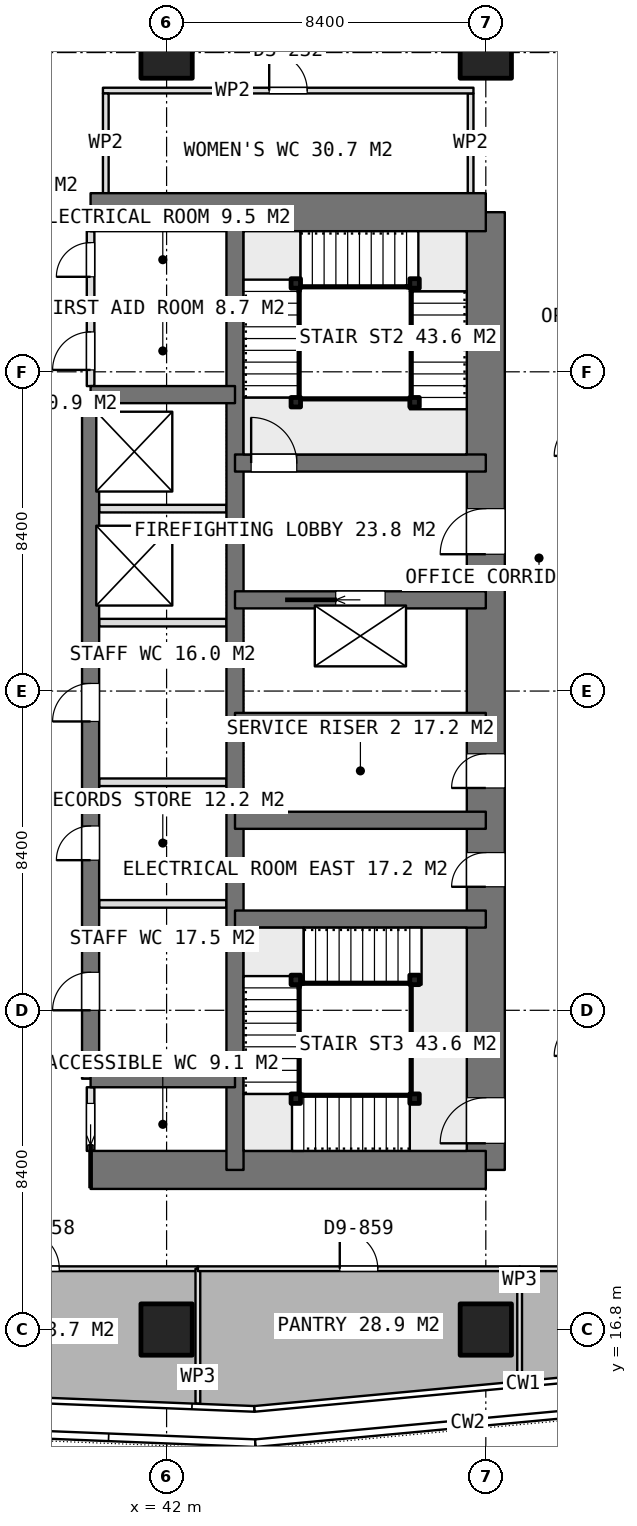
"""IFC4 building model, lengths in metres.
Left out: names, types, materials, properties, quantities, classifications, styles, units other than length and angle.
Written with IfcOpenShell. Run it as: python <this file> out.ifc"""

import sys

from ifc_helpers import new_model, si_unit, direction, frame, frame_2d, origin, origin_2d, place, context, subcontext, project, spatial, rectangle, extrude, element, fill, save


model = new_model("IFC4")
c1 = context("Model", 3, precision=1e-05, world=origin(), true_north=direction((0.0, 1.0)))
c2 = subcontext(c1, "Body", "Model", "MODEL_VIEW")
j1 = project(units=[si_unit("LENGTHUNIT", "METRE"), si_unit("PLANEANGLEUNIT", "RADIAN")], contexts=[c1])
p1 = place(None, origin())
s1 = spatial("IfcSite", under=j1, at=p1, CompositionType="ELEMENT")
p2 = place(p1, origin())
s2 = spatial("IfcBuilding", under=s1, at=p2, CompositionType="ELEMENT")
p3 = place(p2, frame((0.0, 0.0, 213.95)))
s3 = spatial("IfcBuildingStorey", under=s2, at=p3, CompositionType="ELEMENT", Elevation=213.95)
for number, where, z_axis, x_axis in (
    (1, (40.0, 21.0, 0.0), (0.0, 0.0, 1.0), (1.0, 0.0, 0.0)),
    (2, (40.0, 46.2, 0.0), (0.0, 0.0, 1.0), (1.0, 0.0, 0.0)),
):
    element("IfcWall", number, at=place(p3, frame(where, z_axis=z_axis, x_axis=x_axis)), inside=s3, PredefinedType="SHEAR", context=c2, shape_type="SweptSolid", body=[
        extrude(rectangle(XDim=10.4, YDim=1.0, at=frame_2d((5.2, 0.0))), origin(), (0.0, 0.0, 1.0), 3.75),
    ])
p4 = place(p3, frame((50.4, 21.0, 0.0), z_axis=(0.0, 0.0, 1.0), x_axis=(0.0, 1.0, 0.0)))
e3 = element("IfcWall", 3, at=p4, inside=s3, PredefinedType="SHEAR", context=c2, shape_type="SweptSolid", body=[
    extrude(rectangle(XDim=25.2, YDim=1.0, at=frame_2d((12.6, 0.0))), origin(), (0.0, 0.0, 1.0), 3.75),
])
p5 = place(p4, frame((16.2, 0.0, 0.0)))
e4 = element("IfcOpeningElement", 4, at=p5, cuts=e3, PredefinedType="OPENING", context=c2, shape_type="SweptSolid", body=[
    extrude(rectangle(XDim=1.2, YDim=2.1, at=frame_2d((0.6, 1.05))), frame((0.0, 0.51, 0.0), z_axis=(0.0, -1.0, 0.0), x_axis=(1.0, 0.0, 0.0)), (0.0, 0.0, 1.0), 1.02),
])
p6 = place(p4, frame((10.05, 0.0, 0.0)))
e5 = element("IfcOpeningElement", 5, at=p6, cuts=e3, PredefinedType="OPENING", context=c2, shape_type="SweptSolid", body=[
    extrude(rectangle(XDim=0.9, YDim=2.1, at=frame_2d((0.45, 1.05))), frame((0.0, 0.51, 0.0), z_axis=(0.0, -1.0, 0.0), x_axis=(1.0, 0.0, 0.0)), (0.0, 0.0, 1.0), 1.02),
])
p7 = place(p4, frame((7.45, 0.0, 0.0)))
e6 = element("IfcOpeningElement", 6, at=p7, cuts=e3, PredefinedType="OPENING", context=c2, shape_type="SweptSolid", body=[
    extrude(rectangle(XDim=0.9, YDim=2.1, at=frame_2d((0.45, 1.05))), frame((0.0, 0.51, 0.0), z_axis=(0.0, -1.0, 0.0), x_axis=(1.0, 0.0, 0.0)), (0.0, 0.0, 1.0), 1.02),
])
p8 = place(p4, frame((0.7, 0.0, 0.0)))
e7 = element("IfcOpeningElement", 7, at=p8, cuts=e3, PredefinedType="OPENING", context=c2, shape_type="SweptSolid", body=[
    extrude(rectangle(XDim=1.2, YDim=2.1, at=frame_2d((0.6, 1.05))), frame((0.0, 0.51, 0.0), z_axis=(0.0, -1.0, 0.0), x_axis=(1.0, 0.0, 0.0)), (0.0, 0.0, 1.0), 1.02),
])
p9 = place(p3, frame((43.8, 21.0, 0.0), z_axis=(0.0, 0.0, 1.0), x_axis=(0.0, 1.0, 0.0)))
e8 = element("IfcWall", 8, at=p9, inside=s3, PredefinedType="SHEAR", context=c2, shape_type="SweptSolid", body=[
    extrude(rectangle(XDim=25.2, YDim=0.45, at=frame_2d((12.6, 0.0))), origin(), (0.0, 0.0, 1.0), 3.75),
])
p10 = place(p3, frame((40.0, 23.4, 0.0), z_axis=(0.0, 0.0, 1.0), x_axis=(0.0, 1.0, 0.0)))
e9 = element("IfcWall", 9, at=p10, inside=s3, PredefinedType="SHEAR", context=c2, shape_type="SweptSolid", body=[
    extrude(rectangle(XDim=18.0, YDim=0.45, at=frame_2d((9.0, 0.0))), origin(), (0.0, 0.0, 1.0), 3.75),
])
p11 = place(p10, frame((1.8, 0.0, 0.0)))
e10 = element("IfcOpeningElement", 10, at=p11, cuts=e9, PredefinedType="OPENING", context=c2, shape_type="SweptSolid", body=[
    extrude(rectangle(XDim=1.0, YDim=2.1, at=frame_2d((0.5, 1.05))), frame((0.0, 0.235, 0.0), z_axis=(0.0, -1.0, 0.0), x_axis=(1.0, 0.0, 0.0)), (0.0, 0.0, 1.0), 0.47),
])
p12 = place(p10, frame((5.75, 0.0, 0.0)))
e11 = element("IfcOpeningElement", 11, at=p12, cuts=e9, PredefinedType="OPENING", context=c2, shape_type="SweptSolid", body=[
    extrude(rectangle(XDim=0.9, YDim=2.1, at=frame_2d((0.45, 1.05))), frame((0.0, 0.235, 0.0), z_axis=(0.0, -1.0, 0.0), x_axis=(1.0, 0.0, 0.0)), (0.0, 0.0, 1.0), 0.47),
])
p13 = place(p10, frame((9.4, 0.0, 0.0)))
e12 = element("IfcOpeningElement", 12, at=p13, cuts=e9, PredefinedType="OPENING", context=c2, shape_type="SweptSolid", body=[
    extrude(rectangle(XDim=1.0, YDim=2.1, at=frame_2d((0.5, 1.05))), frame((0.0, 0.235, 0.0), z_axis=(0.0, -1.0, 0.0), x_axis=(1.0, 0.0, 0.0)), (0.0, 0.0, 1.0), 0.47),
])
for number, where, z_axis, x_axis in (
    (13, (40.0, 23.4, 0.0), (0.0, 0.0, 1.0), (1.0, 0.0, 0.0)),
    (14, (40.0, 41.4, 0.0), (0.0, 0.0, 1.0), (1.0, 0.0, 0.0)),
):
    element("IfcWall", number, at=place(p3, frame(where, z_axis=z_axis, x_axis=x_axis)), inside=s3, PredefinedType="SHEAR", context=c2, shape_type="SweptSolid", body=[
        extrude(rectangle(XDim=3.8, YDim=0.45, at=frame_2d((1.9, 0.0))), origin(), (0.0, 0.0, 1.0), 3.75),
    ])
for number, where, z_axis, x_axis in (
    (15, (43.8, 27.6, 0.0), (0.0, 0.0, 1.0), (1.0, 0.0, 0.0)),
    (16, (43.8, 30.2, 0.0), (0.0, 0.0, 1.0), (1.0, 0.0, 0.0)),
    (17, (43.8, 32.8, 0.0), (0.0, 0.0, 1.0), (1.0, 0.0, 0.0)),
):
    element("IfcWall", number, at=place(p3, frame(where, z_axis=z_axis, x_axis=x_axis)), inside=s3, PredefinedType="SHEAR", context=c2, shape_type="SweptSolid", body=[
        extrude(rectangle(XDim=6.6, YDim=0.45, at=frame_2d((3.3, 0.0))), origin(), (0.0, 0.0, 1.0), 3.75),
    ])
p14 = place(p3, frame((43.8, 36.0, 0.0), z_axis=(0.0, 0.0, 1.0), x_axis=(1.0, 0.0, 0.0)))
e18 = element("IfcWall", 18, at=p14, inside=s3, PredefinedType="SHEAR", context=c2, shape_type="SweptSolid", body=[
    extrude(rectangle(XDim=6.6, YDim=0.45, at=frame_2d((3.3, 0.0))), origin(), (0.0, 0.0, 1.0), 3.75),
])
p15 = place(p14, frame((2.65, 0.0, 0.0)))
e19 = element("IfcOpeningElement", 19, at=p15, cuts=e18, PredefinedType="OPENING", context=c2, shape_type="SweptSolid", body=[
    extrude(rectangle(XDim=1.3, YDim=2.1, at=frame_2d((0.65, 1.05))), frame((0.0, 0.235, 0.0), z_axis=(0.0, -1.0, 0.0), x_axis=(1.0, 0.0, 0.0)), (0.0, 0.0, 1.0), 0.47),
])
p16 = place(p3, frame((43.8, 39.6, 0.0), z_axis=(0.0, 0.0, 1.0), x_axis=(1.0, 0.0, 0.0)))
e20 = element("IfcWall", 20, at=p16, inside=s3, PredefinedType="SHEAR", context=c2, shape_type="SweptSolid", body=[
    extrude(rectangle(XDim=6.6, YDim=0.45, at=frame_2d((3.3, 0.0))), origin(), (0.0, 0.0, 1.0), 3.75),
])
p17 = place(p16, frame((0.425, 0.0, 0.0)))
e21 = element("IfcOpeningElement", 21, at=p17, cuts=e20, PredefinedType="OPENING", context=c2, shape_type="SweptSolid", body=[
    extrude(rectangle(XDim=1.2, YDim=2.1, at=frame_2d((0.6, 1.05))), frame((0.0, 0.235, 0.0), z_axis=(0.0, -1.0, 0.0), x_axis=(1.0, 0.0, 0.0)), (0.0, 0.0, 1.0), 0.47),
])
for number, where, z_axis, x_axis in (
    (22, (42.0, 16.8, 0.0), (0.0, 0.0, 1.0), (1.0, 0.0, 0.0)),
    (23, (42.0, 50.4, 0.0), (0.0, 0.0, 1.0), (1.0, 0.0, 0.0)),
    (24, (50.4, 16.8, 0.0), (0.0, 0.0, 1.0), (1.0, 0.0, 0.0)),
    (25, (50.4, 50.4, 0.0), (0.0, 0.0, 1.0), (1.0, 0.0, 0.0)),
):
    element("IfcColumn", number, at=place(p3, frame(where, z_axis=z_axis, x_axis=x_axis)), inside=s3, PredefinedType="COLUMN", context=c2, shape_type="SweptSolid", body=[
        extrude(rectangle(XDim=1.35, YDim=1.35, at=origin_2d()), origin(), (0.0, 0.0, 1.0), 3.75),
    ])
for number, where, z_axis, x_axis in (
    (26, (40.225, 35.4, 0.0), (0.0, 0.0, 1.0), (1.0, 0.0, 0.0)),
    (27, (40.225, 38.4, 0.0), (0.0, 0.0, 1.0), (1.0, 0.0, 0.0)),
):
    element("IfcWall", number, at=place(p3, frame(where, z_axis=z_axis, x_axis=x_axis)), inside=s3, PredefinedType="PARTITIONING", context=c2, shape_type="SweptSolid", body=[
        extrude(rectangle(XDim=3.35, YDim=0.2, at=frame_2d((1.675, 0.0))), origin(), (0.0, 0.0, 1.0), 3.5),
    ])
p18 = place(p3, frame((40.0, 21.5, 0.0), z_axis=(0.0, 0.0, 1.0), x_axis=(0.0, 1.0, 0.0)))
e28 = element("IfcWall", 28, at=p18, inside=s3, PredefinedType="PARTITIONING", context=c2, shape_type="SweptSolid", body=[
    extrude(rectangle(XDim=1.675, YDim=0.2, at=frame_2d((0.837, 0.0))), origin(), (0.0, 0.0, 1.0), 3.5),
])
p19 = place(p18, frame((0.15, 0.0, 0.0)))
e29 = element("IfcOpeningElement", 29, at=p19, cuts=e28, PredefinedType="OPENING", context=c2, shape_type="SweptSolid", body=[
    extrude(rectangle(XDim=1.1, YDim=2.1, at=frame_2d((0.55, 1.05))), frame((0.0, 0.11, 0.0), z_axis=(0.0, -1.0, 0.0), x_axis=(1.0, 0.0, 0.0)), (0.0, 0.0, 1.0), 0.22),
])
p20 = place(p3, frame((40.0, 41.625, 0.0), z_axis=(0.0, 0.0, 1.0), x_axis=(0.0, 1.0, 0.0)))
e30 = element("IfcWall", 30, at=p20, inside=s3, PredefinedType="PARTITIONING", context=c2, shape_type="SweptSolid", body=[
    extrude(rectangle(XDim=4.075, YDim=0.2, at=frame_2d((2.038, 0.0))), origin(), (0.0, 0.0, 1.0), 3.5),
])
p21 = place(p20, frame((2.875, 0.0, 0.0)))
e31 = element("IfcOpeningElement", 31, at=p21, cuts=e30, PredefinedType="OPENING", context=c2, shape_type="SweptSolid", body=[
    extrude(rectangle(XDim=0.9, YDim=2.1, at=frame_2d((0.45, 1.05))), frame((0.0, 0.11, 0.0), z_axis=(0.0, -1.0, 0.0), x_axis=(1.0, 0.0, 0.0)), (0.0, 0.0, 1.0), 0.22),
])
p22 = place(p20, frame((0.425, 0.0, 0.0)))
e32 = element("IfcOpeningElement", 32, at=p22, cuts=e30, PredefinedType="OPENING", context=c2, shape_type="SweptSolid", body=[
    extrude(rectangle(XDim=1.0, YDim=2.1, at=frame_2d((0.5, 1.05))), frame((0.0, 0.11, 0.0), z_axis=(0.0, -1.0, 0.0), x_axis=(1.0, 0.0, 0.0)), (0.0, 0.0, 1.0), 0.22),
])
for number, where, z_axis, x_axis in (
    (33, (40.225, 28.0, 0.0), (0.0, 0.0, 1.0), (1.0, 0.0, 0.0)),
    (34, (40.225, 31.2, 0.0), (0.0, 0.0, 1.0), (1.0, 0.0, 0.0)),
):
    element("IfcWall", number, at=place(p3, frame(where, z_axis=z_axis, x_axis=x_axis)), inside=s3, PredefinedType="PARTITIONING", context=c2, shape_type="SweptSolid", body=[
        extrude(rectangle(XDim=3.35, YDim=0.2, at=frame_2d((1.675, 0.0))), origin(), (0.0, 0.0, 1.0), 3.5),
    ])
p23 = place(p3, frame((40.0, 43.7, 0.0), z_axis=(0.0, 0.0, 1.0), x_axis=(1.0, 0.0, 0.0)))
e35 = element("IfcWall", 35, at=p23, inside=s3, PredefinedType="PARTITIONING", context=c2, shape_type="SweptSolid", body=[
    extrude(rectangle(XDim=3.575, YDim=0.2, at=frame_2d((1.788, 0.0))), origin(), (0.0, 0.0, 1.0), 3.5),
])
p24 = place(p3, frame((40.325, 49.4, 0.0), z_axis=(0.0, 0.0, 1.0), x_axis=(1.0, 0.0, 0.0)))
e36 = element("IfcWall", 36, at=p24, inside=s3, PredefinedType="PARTITIONING", context=c2, shape_type="SweptSolid", body=[
    extrude(rectangle(XDim=9.75, YDim=0.15, at=frame_2d((4.875, 0.0))), origin(), (0.0, 0.0, 1.0), 3.5),
])
p25 = place(p24, frame((4.375, 0.0, 0.0)))
e37 = element("IfcOpeningElement", 37, at=p25, cuts=e36, PredefinedType="OPENING", context=c2, shape_type="SweptSolid", body=[
    extrude(rectangle(XDim=1.0, YDim=2.1, at=frame_2d((0.5, 1.05))), frame((0.0, 0.085, 0.0), z_axis=(0.0, -1.0, 0.0), x_axis=(1.0, 0.0, 0.0)), (0.0, 0.0, 1.0), 0.17),
])
for number, where, z_axis, x_axis in (
    (38, (40.4, 46.7, 0.0), (0.0, 0.0, 1.0), (0.0, 1.0, 0.0)),
    (39, (50.0, 46.7, 0.0), (0.0, 0.0, 1.0), (0.0, 1.0, 0.0)),
):
    element("IfcWall", number, at=place(p3, frame(where, z_axis=z_axis, x_axis=x_axis)), inside=s3, PredefinedType="PARTITIONING", context=c2, shape_type="SweptSolid", body=[
        extrude(rectangle(XDim=2.625, YDim=0.15, at=frame_2d((1.312, 0.0))), origin(), (0.0, 0.0, 1.0), 3.5),
    ])
p26 = place(p3, frame((34.531, 18.4, 0.0), z_axis=(0.0, 0.0, 1.0), x_axis=(1.0, 0.0, 0.0)))
e40 = element("IfcWall", 40, at=p26, inside=s3, PredefinedType="PARTITIONING", context=c2, shape_type="SweptSolid", body=[
    extrude(rectangle(XDim=8.292, YDim=0.125, at=frame_2d((4.146, 0.0))), origin(), (0.0, 0.0, 1.0), 3.5),
])
p27 = place(p26, frame((3.646, 0.0, 0.0)))
e41 = element("IfcOpeningElement", 41, at=p27, cuts=e40, PredefinedType="OPENING", context=c2, shape_type="SweptSolid", body=[
    extrude(rectangle(XDim=1.0, YDim=2.1, at=frame_2d((0.5, 1.05))), frame((0.0, 0.073, 0.0), z_axis=(0.0, -1.0, 0.0), x_axis=(1.0, 0.0, 0.0)), (0.0, 0.0, 1.0), 0.145),
])
p28 = place(p3, frame((42.823, 18.4, 0.0), z_axis=(0.0, 0.0, 1.0), x_axis=(0.0, -1.0, 0.0)))
e42 = element("IfcWall", 42, at=p28, inside=s3, PredefinedType="PARTITIONING", context=c2, shape_type="SweptSolid", body=[
    extrude(rectangle(XDim=3.549, YDim=0.125, at=frame_2d((1.774, 0.0))), origin(), (0.0, 0.0, 1.0), 3.5),
])
p29 = place(p3, frame((42.824, 18.4, 0.0), z_axis=(0.0, 0.0, 1.0), x_axis=(1.0, 0.0, 0.0)))
e43 = element("IfcWall", 43, at=p29, inside=s3, PredefinedType="PARTITIONING", context=c2, shape_type="SweptSolid", body=[
    extrude(rectangle(XDim=8.466, YDim=0.125, at=frame_2d((4.233, 0.0))), origin(), (0.0, 0.0, 1.0), 3.5),
])
p30 = place(p29, frame((3.733, 0.0, 0.0)))
e44 = element("IfcOpeningElement", 44, at=p30, cuts=e43, PredefinedType="OPENING", context=c2, shape_type="SweptSolid", body=[
    extrude(rectangle(XDim=1.0, YDim=2.1, at=frame_2d((0.5, 1.05))), frame((0.0, 0.073, 0.0), z_axis=(0.0, -1.0, 0.0), x_axis=(1.0, 0.0, 0.0)), (0.0, 0.0, 1.0), 0.145),
])
p31 = place(p3, frame((51.29, 18.4, 0.0), z_axis=(0.0, 0.0, 1.0), x_axis=(0.0, -1.0, 0.0)))
e45 = element("IfcWall", 45, at=p31, inside=s3, PredefinedType="PARTITIONING", context=c2, shape_type="SweptSolid", body=[
    extrude(rectangle(XDim=2.958, YDim=0.125, at=frame_2d((1.479, 0.0))), origin(), (0.0, 0.0, 1.0), 3.5),
])
p32 = place(p3, frame((51.291, 18.4, 0.0), z_axis=(0.0, 0.0, 1.0), x_axis=(1.0, 0.0, 0.0)))
e46 = element("IfcWall", 46, at=p32, inside=s3, PredefinedType="PARTITIONING", context=c2, shape_type="SweptSolid", body=[
    extrude(rectangle(XDim=5.109, YDim=0.125, at=frame_2d((2.554, 0.0))), origin(), (0.0, 0.0, 1.0), 3.5),
])
p33 = place(p32, frame((1.655, 0.0, 0.0)))
e47 = element("IfcOpeningElement", 47, at=p33, cuts=e46, PredefinedType="OPENING", context=c2, shape_type="SweptSolid", body=[
    extrude(rectangle(XDim=1.8, YDim=2.1, at=frame_2d((0.9, 1.05))), frame((0.0, 0.073, 0.0), z_axis=(0.0, -1.0, 0.0), x_axis=(1.0, 0.0, 0.0)), (0.0, 0.0, 1.0), 0.145),
])
for number, where, z_axis, x_axis in (
    (48, (45.4, 41.2, 0.0), (0.0, 0.0, 1.0), (1.0, 0.0, 0.0)),
    (49, (45.4, 44.325, 0.0), (0.0, 0.0, 1.0), (1.0, 0.0, 0.0)),
    (50, (48.525, 44.325, 0.0), (0.0, 0.0, 1.0), (1.0, 0.0, 0.0)),
    (51, (48.525, 41.2, 0.0), (0.0, 0.0, 1.0), (1.0, 0.0, 0.0)),
    (52, (48.525, 22.875, 0.0), (0.0, 0.0, 1.0), (1.0, 0.0, 0.0)),
    (53, (45.4, 22.875, 0.0), (0.0, 0.0, 1.0), (1.0, 0.0, 0.0)),
    (54, (45.4, 26.0, 0.0), (0.0, 0.0, 1.0), (1.0, 0.0, 0.0)),
    (55, (48.525, 26.0, 0.0), (0.0, 0.0, 1.0), (1.0, 0.0, 0.0)),
):
    element("IfcColumn", number, at=place(p3, frame(where, z_axis=z_axis, x_axis=x_axis)), inside=s3, PredefinedType="COLUMN", context=c2, shape_type="SweptSolid", body=[
        extrude(rectangle(XDim=0.25, YDim=0.25, at=origin_2d()), origin(), (0.0, 0.0, 1.0), 3.75),
    ])
p34 = place(p5, origin())
e56 = element("IfcDoor", 56, at=p34, inside=s3, OperationType="SINGLE_SWING_LEFT", PredefinedType="DOOR", context=c2, shape_type="SweptSolid", body=[
    extrude(rectangle(XDim=1.2, YDim=2.1, at=frame_2d((0.6, 1.05))), frame((0.0, 0.025, 0.0), z_axis=(0.0, -1.0, 0.0), x_axis=(1.0, 0.0, 0.0)), (0.0, 0.0, 1.0), 0.05),
])
fill(e4, e56)
p35 = place(p6, origin())
e57 = element("IfcDoor", 57, at=p35, inside=s3, OperationType="SINGLE_SWING_LEFT", PredefinedType="DOOR", context=c2, shape_type="SweptSolid", body=[
    extrude(rectangle(XDim=0.9, YDim=2.1, at=frame_2d((0.45, 1.05))), frame((0.0, 0.025, 0.0), z_axis=(0.0, -1.0, 0.0), x_axis=(1.0, 0.0, 0.0)), (0.0, 0.0, 1.0), 0.05),
])
fill(e5, e57)
p36 = place(p7, origin())
e58 = element("IfcDoor", 58, at=p36, inside=s3, OperationType="SINGLE_SWING_LEFT", PredefinedType="DOOR", context=c2, shape_type="SweptSolid", body=[
    extrude(rectangle(XDim=0.9, YDim=2.1, at=frame_2d((0.45, 1.05))), frame((0.0, 0.025, 0.0), z_axis=(0.0, -1.0, 0.0), x_axis=(1.0, 0.0, 0.0)), (0.0, 0.0, 1.0), 0.05),
])
fill(e6, e58)
p37 = place(p19, origin())
e59 = element("IfcDoor", 59, at=p37, inside=s3, OperationType="SLIDING_TO_LEFT", PredefinedType="DOOR", context=c2, shape_type="SweptSolid", body=[
    extrude(rectangle(XDim=1.1, YDim=2.1, at=frame_2d((0.55, 1.05))), frame((0.0, 0.025, 0.0), z_axis=(0.0, -1.0, 0.0), x_axis=(1.0, 0.0, 0.0)), (0.0, 0.0, 1.0), 0.05),
])
fill(e29, e59)
p38 = place(p21, origin())
e60 = element("IfcDoor", 60, at=p38, inside=s3, OperationType="SINGLE_SWING_LEFT", PredefinedType="DOOR", context=c2, shape_type="SweptSolid", body=[
    extrude(rectangle(XDim=0.9, YDim=2.1, at=frame_2d((0.45, 1.05))), frame((0.0, 0.025, 0.0), z_axis=(0.0, -1.0, 0.0), x_axis=(1.0, 0.0, 0.0)), (0.0, 0.0, 1.0), 0.05),
])
fill(e31, e60)
p39 = place(p22, origin())
e61 = element("IfcDoor", 61, at=p39, inside=s3, OperationType="SINGLE_SWING_LEFT", PredefinedType="DOOR", context=c2, shape_type="SweptSolid", body=[
    extrude(rectangle(XDim=1.0, YDim=2.1, at=frame_2d((0.5, 1.05))), frame((0.0, 0.025, 0.0), z_axis=(0.0, -1.0, 0.0), x_axis=(1.0, 0.0, 0.0)), (0.0, 0.0, 1.0), 0.05),
])
fill(e32, e61)
p40 = place(p11, origin())
e62 = element("IfcDoor", 62, at=p40, inside=s3, OperationType="SINGLE_SWING_LEFT", PredefinedType="DOOR", context=c2, shape_type="SweptSolid", body=[
    extrude(rectangle(XDim=1.0, YDim=2.1, at=frame_2d((0.5, 1.05))), frame((0.0, 0.025, 0.0), z_axis=(0.0, -1.0, 0.0), x_axis=(1.0, 0.0, 0.0)), (0.0, 0.0, 1.0), 0.05),
])
fill(e10, e62)
p41 = place(p12, origin())
e63 = element("IfcDoor", 63, at=p41, inside=s3, OperationType="SINGLE_SWING_LEFT", PredefinedType="DOOR", context=c2, shape_type="SweptSolid", body=[
    extrude(rectangle(XDim=0.9, YDim=2.1, at=frame_2d((0.45, 1.05))), frame((0.0, 0.025, 0.0), z_axis=(0.0, -1.0, 0.0), x_axis=(1.0, 0.0, 0.0)), (0.0, 0.0, 1.0), 0.05),
])
fill(e11, e63)
p42 = place(p13, origin())
e64 = element("IfcDoor", 64, at=p42, inside=s3, OperationType="SINGLE_SWING_LEFT", PredefinedType="DOOR", context=c2, shape_type="SweptSolid", body=[
    extrude(rectangle(XDim=1.0, YDim=2.1, at=frame_2d((0.5, 1.05))), frame((0.0, 0.025, 0.0), z_axis=(0.0, -1.0, 0.0), x_axis=(1.0, 0.0, 0.0)), (0.0, 0.0, 1.0), 0.05),
])
fill(e12, e64)
p43 = place(p15, origin())
e65 = element("IfcDoor", 65, at=p43, inside=s3, OperationType="SLIDING_TO_LEFT", PredefinedType="USERDEFINED", context=c2, shape_type="SweptSolid", body=[
    extrude(rectangle(XDim=1.3, YDim=2.1, at=frame_2d((0.65, 1.05))), frame((0.0, 0.025, 0.0), z_axis=(0.0, -1.0, 0.0), x_axis=(1.0, 0.0, 0.0)), (0.0, 0.0, 1.0), 0.05),
])
fill(e19, e65)
p44 = place(p25, origin())
e66 = element("IfcDoor", 66, at=p44, inside=s3, OperationType="SINGLE_SWING_LEFT", PredefinedType="DOOR", context=c2, shape_type="SweptSolid", body=[
    extrude(rectangle(XDim=1.0, YDim=2.1, at=frame_2d((0.5, 1.05))), frame((0.0, 0.025, 0.0), z_axis=(0.0, -1.0, 0.0), x_axis=(1.0, 0.0, 0.0)), (0.0, 0.0, 1.0), 0.05),
])
fill(e37, e66)
p45 = place(p27, origin())
e67 = element("IfcDoor", 67, at=p45, inside=s3, OperationType="SINGLE_SWING_LEFT", PredefinedType="DOOR", context=c2, shape_type="SweptSolid", body=[
    extrude(rectangle(XDim=1.0, YDim=2.1, at=frame_2d((0.5, 1.05))), frame((0.0, 0.025, 0.0), z_axis=(0.0, -1.0, 0.0), x_axis=(1.0, 0.0, 0.0)), (0.0, 0.0, 1.0), 0.05),
])
fill(e41, e67)
p46 = place(p30, origin())
e68 = element("IfcDoor", 68, at=p46, inside=s3, OperationType="SINGLE_SWING_LEFT", PredefinedType="DOOR", context=c2, shape_type="SweptSolid", body=[
    extrude(rectangle(XDim=1.0, YDim=2.1, at=frame_2d((0.5, 1.05))), frame((0.0, 0.025, 0.0), z_axis=(0.0, -1.0, 0.0), x_axis=(1.0, 0.0, 0.0)), (0.0, 0.0, 1.0), 0.05),
])
fill(e44, e68)
p47 = place(p17, origin())
e69 = element("IfcDoor", 69, at=p47, inside=s3, OperationType="SINGLE_SWING_RIGHT", PredefinedType="DOOR", context=c2, shape_type="SweptSolid", body=[
    extrude(rectangle(XDim=1.2, YDim=2.1, at=frame_2d((0.6, 1.05))), frame((0.0, 0.025, 0.0), z_axis=(0.0, -1.0, 0.0), x_axis=(1.0, 0.0, 0.0)), (0.0, 0.0, 1.0), 0.05),
])
fill(e21, e69)
p48 = place(p8, origin())
e70 = element("IfcDoor", 70, at=p48, inside=s3, OperationType="SINGLE_SWING_RIGHT", PredefinedType="DOOR", context=c2, shape_type="SweptSolid", body=[
    extrude(rectangle(XDim=1.2, YDim=2.1, at=frame_2d((0.6, 1.05))), frame((0.0, 0.025, 0.0), z_axis=(0.0, -1.0, 0.0), x_axis=(1.0, 0.0, 0.0)), (0.0, 0.0, 1.0), 0.05),
])
fill(e7, e70)
save(model, sys.argv[1])
